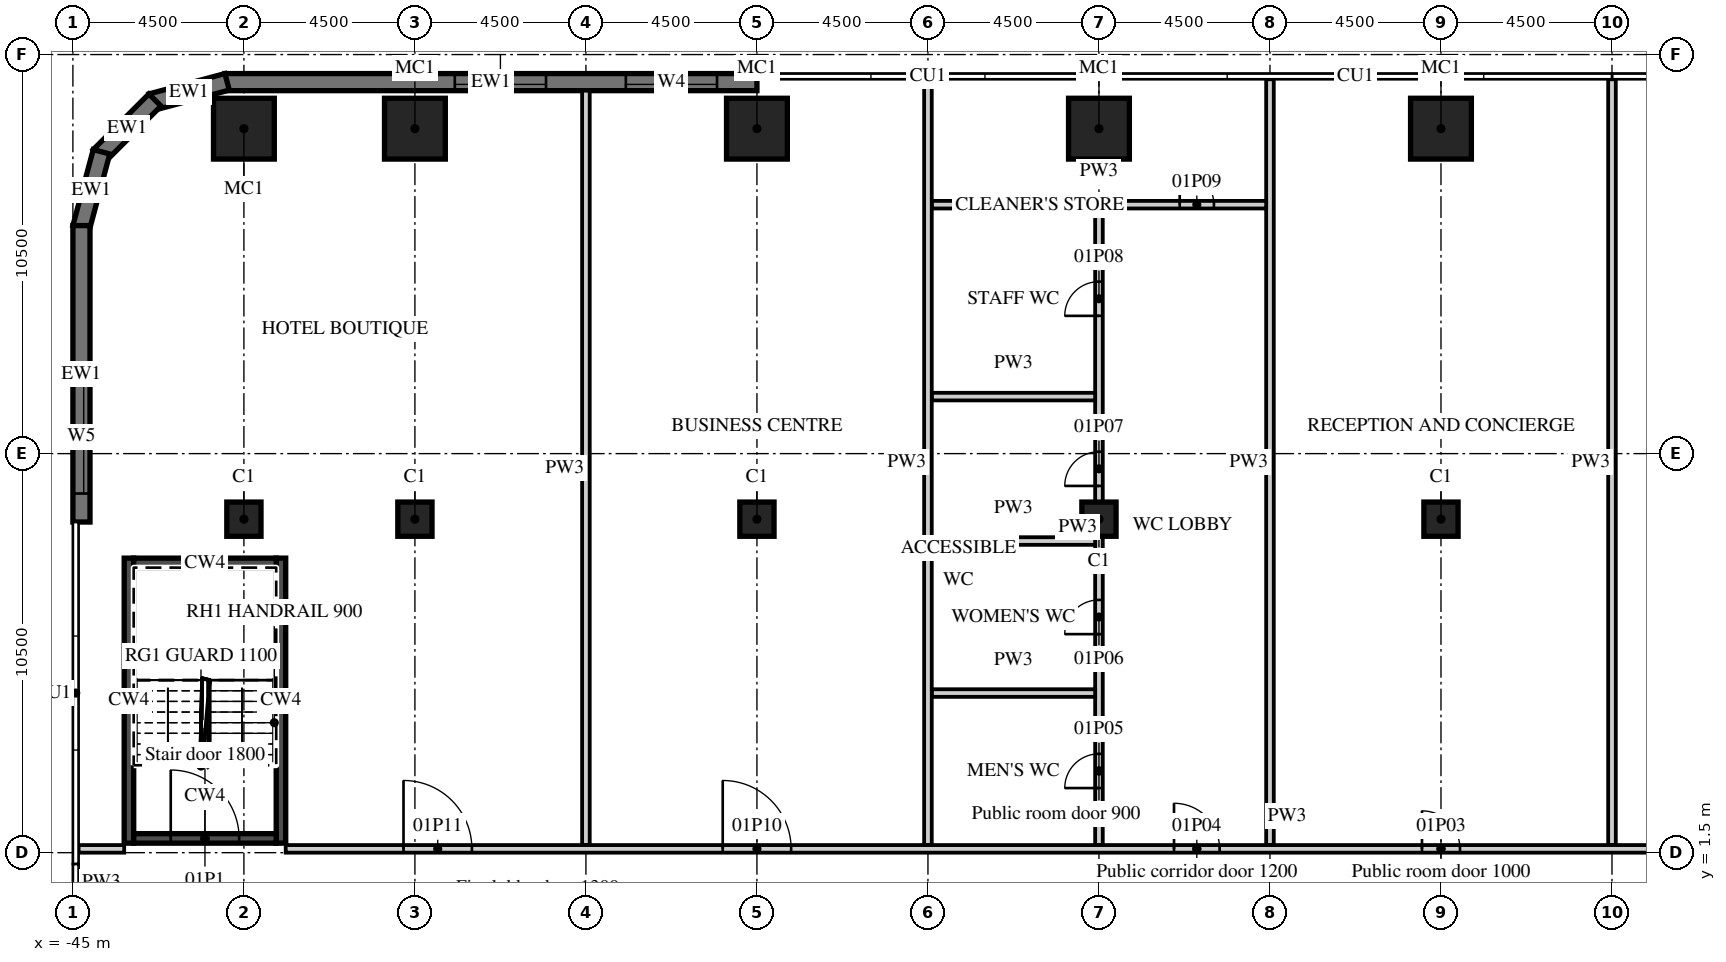
"""IFC4 building model, lengths in metres.
Left out: names, types, materials, properties, quantities, classifications, styles, units other than length and angle.
Written with IfcOpenShell. Run it as: python <this file> out.ifc"""

import sys

from ifc_helpers import new_model, si_unit, direction, frame, frame_2d, origin, origin_2d, place, context, subcontext, project, spatial, polyline, rectangle, outline, extrude, element, fill, save


model = new_model("IFC4")
c1 = context("Model", 3, precision=1e-05, world=origin(), true_north=direction((0.0, 1.0)))
c2 = subcontext(c1, "Body", "Model", "MODEL_VIEW")
j1 = project(units=[si_unit("LENGTHUNIT", "METRE"), si_unit("PLANEANGLEUNIT", "RADIAN")], contexts=[c1])
p1 = place(None, origin())
s1 = spatial("IfcSite", under=j1, at=p1, CompositionType="ELEMENT")
p2 = place(p1, origin())
s2 = spatial("IfcBuilding", under=s1, at=p2, CompositionType="ELEMENT")
p3 = place(p2, frame((0.0, 0.0, 11.0)))
s3 = spatial("IfcBuildingStorey", under=s2, at=p3, CompositionType="ELEMENT", Elevation=11.0)
for number, where, z_axis, x_axis in (
    (1, (-40.5, 20.55, 0.0), (0.0, 0.0, 1.0), (1.0, 0.0, 0.0)),
    (2, (-36.0, 20.55, 0.0), (0.0, 0.0, 1.0), (1.0, 0.0, 0.0)),
    (3, (-27.0, 20.55, 0.0), (0.0, 0.0, 1.0), (1.0, 0.0, 0.0)),
    (4, (-18.0, 20.55, 0.0), (0.0, 0.0, 1.0), (1.0, 0.0, 0.0)),
    (5, (-9.0, 20.55, 0.0), (0.0, 0.0, 1.0), (1.0, 0.0, 0.0)),
):
    element("IfcColumn", number, at=place(p3, frame(where, z_axis=z_axis, x_axis=x_axis)), inside=s3, PredefinedType="COLUMN", context=c2, shape_type="SweptSolid", body=[
        extrude(rectangle(XDim=1.6, YDim=1.6, at=origin_2d()), origin(), (0.0, 0.0, 1.0), 6.0),
    ])
for number, where, z_axis, x_axis in (
    (6, (-40.5, 10.275, 0.0), (0.0, 0.0, 1.0), (1.0, 0.0, 0.0)),
    (7, (-36.0, 10.275, 0.0), (0.0, 0.0, 1.0), (1.0, 0.0, 0.0)),
    (8, (-27.0, 10.275, 0.0), (0.0, 0.0, 1.0), (1.0, 0.0, 0.0)),
    (9, (-18.0, 10.275, 0.0), (0.0, 0.0, 1.0), (1.0, 0.0, 0.0)),
    (10, (-9.0, 10.275, 0.0), (0.0, 0.0, 1.0), (1.0, 0.0, 0.0)),
):
    element("IfcColumn", number, at=place(p3, frame(where, z_axis=z_axis, x_axis=x_axis)), inside=s3, PredefinedType="COLUMN", context=c2, shape_type="SweptSolid", body=[
        extrude(rectangle(XDim=0.9, YDim=0.9, at=origin_2d()), origin(), (0.0, 0.0, 1.0), 6.0),
    ])
p4 = place(p3, frame((-27.0, 21.775, 0.0), z_axis=(0.0, 0.0, 1.0), x_axis=(-1.0, 0.0, 0.0)))
e11 = element("IfcWall", 11, at=p4, inside=s3, PredefinedType="SOLIDWALL", context=c2, shape_type="SweptSolid", body=[
    extrude(rectangle(XDim=14.0, YDim=0.45, at=frame_2d((7.0, 0.0))), origin(), (0.0, 0.0, 1.0), 5.55),
])
p5 = place(p4, frame((1.05, 0.0, 0.9)))
e12 = element("IfcOpeningElement", 12, at=p5, cuts=e11, PredefinedType="OPENING", context=c2, shape_type="SweptSolid", body=[
    extrude(rectangle(XDim=2.4, YDim=1.8, at=frame_2d((1.2, 0.9))), frame((0.0, 0.235, 0.0), z_axis=(0.0, -1.0, 0.0), x_axis=(1.0, 0.0, 0.0)), (0.0, 0.0, 1.0), 0.47),
])
p6 = place(p4, frame((5.55, 0.0, 0.9)))
e13 = element("IfcOpeningElement", 13, at=p6, cuts=e11, PredefinedType="OPENING", context=c2, shape_type="SweptSolid", body=[
    extrude(rectangle(XDim=2.4, YDim=1.8, at=frame_2d((1.2, 0.9))), frame((0.0, 0.235, 0.0), z_axis=(0.0, -1.0, 0.0), x_axis=(1.0, 0.0, 0.0)), (0.0, 0.0, 1.0), 0.47),
])
p7 = place(p3, frame((-40.942, 21.783, 0.0), z_axis=(0.0, 0.0, 1.0), x_axis=(-0.965926999034, -0.25881466832, 0.0)))
e14 = element("IfcWall", 14, at=p7, inside=s3, PredefinedType="SOLIDWALL", context=c2, shape_type="SweptSolid", body=[
    extrude(outline(polyline([(0.0, -0.225), (2.071, -0.225), (1.95, 0.225), (0.121, 0.225), (0.0, -0.225)])), origin(), (0.0, 0.0, 1.0), 5.55),
])
p8 = place(p3, frame((-42.841, 21.305, 0.0), z_axis=(0.0, 0.0, 1.0), x_axis=(-0.707106781187, -0.707106781187, 0.0)))
e15 = element("IfcWall", 15, at=p8, inside=s3, PredefinedType="SOLIDWALL", context=c2, shape_type="SweptSolid", body=[
    extrude(outline(polyline([(0.0, -0.225), (2.071, -0.225), (1.95, 0.225), (0.121, 0.225), (0.0, -0.225)])), origin(), (0.0, 0.0, 1.0), 5.55),
])
p9 = place(p3, frame((-44.247, 19.942, 0.0), z_axis=(0.0, 0.0, 1.0), x_axis=(-0.25881466832, -0.965926999034, 0.0)))
e16 = element("IfcWall", 16, at=p9, inside=s3, PredefinedType="SOLIDWALL", context=c2, shape_type="SweptSolid", body=[
    extrude(outline(polyline([(-0.0, -0.225), (2.07, -0.225), (1.95, 0.225), (0.12, 0.225), (-0.0, -0.225)])), origin(), (0.0, 0.0, 1.0), 5.55),
])
p10 = place(p3, frame((-44.775, 18.0, 0.0), z_axis=(0.0, 0.0, 1.0), x_axis=(0.0, -1.0, 0.0)))
e17 = element("IfcWall", 17, at=p10, inside=s3, PredefinedType="SOLIDWALL", context=c2, shape_type="SweptSolid", body=[
    extrude(rectangle(XDim=7.8, YDim=0.45, at=frame_2d((3.9, 0.0))), origin(), (0.0, 0.0, 1.0), 5.55),
])
p11 = place(p10, frame((4.05, 0.0, 0.9)))
e18 = element("IfcOpeningElement", 18, at=p11, cuts=e17, PredefinedType="OPENING", context=c2, shape_type="SweptSolid", body=[
    extrude(rectangle(XDim=3.0, YDim=1.8, at=frame_2d((1.5, 0.9))), frame((0.0, 0.235, 0.0), z_axis=(0.0, -1.0, 0.0), x_axis=(1.0, 0.0, 0.0)), (0.0, 0.0, 1.0), 0.47),
])
for number, where, z_axis, x_axis in (
    (19, (-43.525, 1.75, 0.0), (0.0, 0.0, 1.0), (0.0, 1.0, 0.0)),
    (20, (-39.525, 1.75, 0.0), (0.0, 0.0, 1.0), (0.0, 1.0, 0.0)),
):
    element("IfcWall", number, at=place(p3, frame(where, z_axis=z_axis, x_axis=x_axis)), inside=s3, PredefinedType="SHEAR", context=c2, shape_type="SweptSolid", body=[
        extrude(rectangle(XDim=7.5, YDim=0.25, at=frame_2d((3.75, 0.0))), origin(), (0.0, 0.0, 1.0), 5.55),
    ])
p12 = place(p3, frame((-43.4, 9.125, 0.0), z_axis=(0.0, 0.0, 1.0), x_axis=(1.0, 0.0, 0.0)))
e21 = element("IfcWall", 21, at=p12, inside=s3, PredefinedType="SHEAR", context=c2, shape_type="SweptSolid", body=[
    extrude(rectangle(XDim=3.75, YDim=0.25, at=frame_2d((1.875, 0.0))), origin(), (0.0, 0.0, 1.0), 5.55),
])
p13 = place(p3, frame((-43.4, 1.875, 0.0), z_axis=(0.0, 0.0, 1.0), x_axis=(1.0, 0.0, 0.0)))
e22 = element("IfcWall", 22, at=p13, inside=s3, PredefinedType="SHEAR", context=c2, shape_type="SweptSolid", body=[
    extrude(rectangle(XDim=3.75, YDim=0.25, at=frame_2d((1.875, 0.0))), origin(), (0.0, 0.0, 1.0), 5.55),
])
p14 = place(p13, frame((0.975, 0.0, 0.0)))
e23 = element("IfcOpeningElement", 23, at=p14, cuts=e22, PredefinedType="OPENING", context=c2, shape_type="SweptSolid", body=[
    extrude(rectangle(XDim=1.8, YDim=2.1, at=frame_2d((0.9, 1.05))), frame((0.0, 0.135, 0.0), z_axis=(0.0, -1.0, 0.0), x_axis=(1.0, 0.0, 0.0)), (0.0, 0.0, 1.0), 0.27),
])
for number, where, z_axis, x_axis in (
    (24, (-4.5, 1.7, 0.0), (0.0, 0.0, 1.0), (0.0, 1.0, 0.0)),
    (25, (-13.5, 1.7, 0.0), (0.0, 0.0, 1.0), (0.0, 1.0, 0.0)),
):
    element("IfcWall", number, at=place(p3, frame(where, z_axis=z_axis, x_axis=x_axis)), inside=s3, PredefinedType="PARTITIONING", context=c2, shape_type="SweptSolid", body=[
        extrude(rectangle(XDim=20.15, YDim=0.2, at=frame_2d((10.075, 0.0))), origin(), (0.0, 0.0, 1.0), 5.55),
    ])
p15 = place(p3, frame((-18.0, 1.7, 0.0), z_axis=(0.0, 0.0, 1.0), x_axis=(0.0, 1.0, 0.0)))
e26 = element("IfcWall", 26, at=p15, inside=s3, PredefinedType="PARTITIONING", context=c2, shape_type="SweptSolid", body=[
    extrude(rectangle(XDim=16.75, YDim=0.2, at=frame_2d((8.375, 0.0))), origin(), (0.0, 0.0, 1.0), 5.55),
])
p16 = place(p15, frame((1.5, 0.0, 0.0)))
e27 = element("IfcOpeningElement", 27, at=p16, cuts=e26, PredefinedType="OPENING", context=c2, shape_type="SweptSolid", body=[
    extrude(rectangle(XDim=0.9, YDim=2.1, at=frame_2d((0.45, 1.05))), frame((0.0, 0.11, 0.0), z_axis=(0.0, -1.0, 0.0), x_axis=(1.0, 0.0, 0.0)), (0.0, 0.0, 1.0), 0.22),
])
p17 = place(p15, frame((5.55, 0.0, 0.0)))
e28 = element("IfcOpeningElement", 28, at=p17, cuts=e26, PredefinedType="OPENING", context=c2, shape_type="SweptSolid", body=[
    extrude(rectangle(XDim=0.9, YDim=2.1, at=frame_2d((0.45, 1.05))), frame((0.0, 0.11, 0.0), z_axis=(0.0, -1.0, 0.0), x_axis=(1.0, 0.0, 0.0)), (0.0, 0.0, 1.0), 0.22),
])
p18 = place(p15, frame((9.45, 0.0, 0.0)))
e29 = element("IfcOpeningElement", 29, at=p18, cuts=e26, PredefinedType="OPENING", context=c2, shape_type="SweptSolid", body=[
    extrude(rectangle(XDim=0.9, YDim=2.1, at=frame_2d((0.45, 1.05))), frame((0.0, 0.11, 0.0), z_axis=(0.0, -1.0, 0.0), x_axis=(1.0, 0.0, 0.0)), (0.0, 0.0, 1.0), 0.22),
])
p19 = place(p15, frame((13.925, 0.0, 0.0)))
e30 = element("IfcOpeningElement", 30, at=p19, cuts=e26, PredefinedType="OPENING", context=c2, shape_type="SweptSolid", body=[
    extrude(rectangle(XDim=0.9, YDim=2.1, at=frame_2d((0.45, 1.05))), frame((0.0, 0.11, 0.0), z_axis=(0.0, -1.0, 0.0), x_axis=(1.0, 0.0, 0.0)), (0.0, 0.0, 1.0), 0.22),
])
for number, where, z_axis, x_axis in (
    (31, (-22.4, 5.7, 0.0), (0.0, 0.0, 1.0), (1.0, 0.0, 0.0)),
    (32, (-22.4, 9.7, 0.0), (0.0, 0.0, 1.0), (1.0, 0.0, 0.0)),
    (33, (-22.4, 13.5, 0.0), (0.0, 0.0, 1.0), (1.0, 0.0, 0.0)),
):
    element("IfcWall", number, at=place(p3, frame(where, z_axis=z_axis, x_axis=x_axis)), inside=s3, PredefinedType="PARTITIONING", context=c2, shape_type="SweptSolid", body=[
        extrude(rectangle(XDim=4.3, YDim=0.2, at=frame_2d((2.15, 0.0))), origin(), (0.0, 0.0, 1.0), 5.55),
    ])
p20 = place(p3, frame((-22.4, 18.55, 0.0), z_axis=(0.0, 0.0, 1.0), x_axis=(1.0, 0.0, 0.0)))
e34 = element("IfcWall", 34, at=p20, inside=s3, PredefinedType="PARTITIONING", context=c2, shape_type="SweptSolid", body=[
    extrude(rectangle(XDim=8.8, YDim=0.2, at=frame_2d((4.4, 0.0))), origin(), (0.0, 0.0, 1.0), 5.55),
])
p21 = place(p20, frame((6.525, 0.0, 0.0)))
e35 = element("IfcOpeningElement", 35, at=p21, cuts=e34, PredefinedType="OPENING", context=c2, shape_type="SweptSolid", body=[
    extrude(rectangle(XDim=0.9, YDim=2.1, at=frame_2d((0.45, 1.05))), frame((0.0, 0.11, 0.0), z_axis=(0.0, -1.0, 0.0), x_axis=(1.0, 0.0, 0.0)), (0.0, 0.0, 1.0), 0.22),
])
p22 = place(p3, frame((-22.5, 1.7, 0.0), z_axis=(0.0, 0.0, 1.0), x_axis=(0.0, 1.0, 0.0)))
e36 = element("IfcWall", 36, at=p22, inside=s3, PredefinedType="PARTITIONING", context=c2, shape_type="SweptSolid", body=[
    extrude(rectangle(XDim=20.15, YDim=0.2, at=frame_2d((10.075, 0.0))), origin(), (0.0, 0.0, 1.0), 5.55),
])
p23 = place(p3, frame((-31.5, 1.7, 0.0), z_axis=(0.0, 0.0, 1.0), x_axis=(0.0, 1.0, 0.0)))
e37 = element("IfcWall", 37, at=p23, inside=s3, PredefinedType="PARTITIONING", context=c2, shape_type="SweptSolid", body=[
    extrude(rectangle(XDim=19.85, YDim=0.2, at=frame_2d((9.925, 0.0))), origin(), (0.0, 0.0, 1.0), 5.55),
])
p24 = place(p3, frame((-39.4, 1.6, 0.0), z_axis=(0.0, 0.0, 1.0), x_axis=(1.0, 0.0, 0.0)))
e38 = element("IfcWall", 38, at=p24, inside=s3, PredefinedType="PARTITIONING", context=c2, shape_type="SweptSolid", body=[
    extrude(rectangle(XDim=52.7, YDim=0.2, at=frame_2d((26.35, 0.0))), origin(), (0.0, 0.0, 1.0), 5.55),
])
p25 = place(p24, frame((46.49, 0.0, 0.0)))
e39 = element("IfcOpeningElement", 39, at=p25, cuts=e38, PredefinedType="OPENING", context=c2, shape_type="SweptSolid", body=[
    extrude(rectangle(XDim=1.8, YDim=2.1, at=frame_2d((0.9, 1.05))), frame((0.0, 0.11, 0.0), z_axis=(0.0, -1.0, 0.0), x_axis=(1.0, 0.0, 0.0)), (0.0, 0.0, 1.0), 0.22),
])
p26 = place(p24, frame((39.41, 0.0, 0.0)))
e40 = element("IfcOpeningElement", 40, at=p26, cuts=e38, PredefinedType="OPENING", context=c2, shape_type="SweptSolid", body=[
    extrude(rectangle(XDim=1.8, YDim=2.1, at=frame_2d((0.9, 1.05))), frame((0.0, 0.11, 0.0), z_axis=(0.0, -1.0, 0.0), x_axis=(1.0, 0.0, 0.0)), (0.0, 0.0, 1.0), 0.22),
])
p27 = place(p24, frame((29.9, 0.0, 0.0)))
e41 = element("IfcOpeningElement", 41, at=p27, cuts=e38, PredefinedType="OPENING", context=c2, shape_type="SweptSolid", body=[
    extrude(rectangle(XDim=1.0, YDim=2.1, at=frame_2d((0.5, 1.05))), frame((0.0, 0.11, 0.0), z_axis=(0.0, -1.0, 0.0), x_axis=(1.0, 0.0, 0.0)), (0.0, 0.0, 1.0), 0.22),
])
p28 = place(p24, frame((23.375, 0.0, 0.0)))
e42 = element("IfcOpeningElement", 42, at=p28, cuts=e38, PredefinedType="OPENING", context=c2, shape_type="SweptSolid", body=[
    extrude(rectangle(XDim=1.2, YDim=2.1, at=frame_2d((0.6, 1.05))), frame((0.0, 0.11, 0.0), z_axis=(0.0, -1.0, 0.0), x_axis=(1.0, 0.0, 0.0)), (0.0, 0.0, 1.0), 0.22),
])
p29 = place(p24, frame((11.5, 0.0, 0.0)))
e43 = element("IfcOpeningElement", 43, at=p29, cuts=e38, PredefinedType="OPENING", context=c2, shape_type="SweptSolid", body=[
    extrude(rectangle(XDim=1.8, YDim=2.1, at=frame_2d((0.9, 1.05))), frame((0.0, 0.11, 0.0), z_axis=(0.0, -1.0, 0.0), x_axis=(1.0, 0.0, 0.0)), (0.0, 0.0, 1.0), 0.22),
])
p30 = place(p24, frame((3.1, 0.0, 0.0)))
e44 = element("IfcOpeningElement", 44, at=p30, cuts=e38, PredefinedType="OPENING", context=c2, shape_type="SweptSolid", body=[
    extrude(rectangle(XDim=1.8, YDim=2.1, at=frame_2d((0.9, 1.05))), frame((0.0, 0.11, 0.0), z_axis=(0.0, -1.0, 0.0), x_axis=(1.0, 0.0, 0.0)), (0.0, 0.0, 1.0), 0.22),
])
p31 = place(p3, frame((-44.85, 1.6, 0.0), z_axis=(0.0, 0.0, 1.0), x_axis=(1.0, 0.0, 0.0)))
e45 = element("IfcWall", 45, at=p31, inside=s3, PredefinedType="PARTITIONING", context=c2, shape_type="SweptSolid", body=[
    extrude(rectangle(XDim=1.2, YDim=0.2, at=frame_2d((0.6, 0.0))), origin(), (0.0, 0.0, 1.0), 5.55),
])
p32 = place(p5, origin())
e46 = element("IfcWindow", 46, at=p32, inside=s3, PartitioningType="SINGLE_PANEL", PredefinedType="WINDOW", context=c2, shape_type="SweptSolid", body=[
    extrude(rectangle(XDim=2.4, YDim=1.8, at=frame_2d((1.2, 0.9))), frame((0.0, 0.09, 0.0), z_axis=(0.0, -1.0, 0.0), x_axis=(1.0, 0.0, 0.0)), (0.0, 0.0, 1.0), 0.06),
])
fill(e12, e46)
p33 = place(p6, origin())
e47 = element("IfcWindow", 47, at=p33, inside=s3, PartitioningType="SINGLE_PANEL", PredefinedType="WINDOW", context=c2, shape_type="SweptSolid", body=[
    extrude(rectangle(XDim=2.4, YDim=1.8, at=frame_2d((1.2, 0.9))), frame((0.0, 0.09, 0.0), z_axis=(0.0, -1.0, 0.0), x_axis=(1.0, 0.0, 0.0)), (0.0, 0.0, 1.0), 0.06),
])
fill(e13, e47)
p34 = place(p11, origin())
e48 = element("IfcWindow", 48, at=p34, inside=s3, PartitioningType="SINGLE_PANEL", PredefinedType="WINDOW", context=c2, shape_type="SweptSolid", body=[
    extrude(rectangle(XDim=3.0, YDim=1.8, at=frame_2d((1.5, 0.9))), frame((0.0, 0.09, 0.0), z_axis=(0.0, -1.0, 0.0), x_axis=(1.0, 0.0, 0.0)), (0.0, 0.0, 1.0), 0.06),
])
fill(e18, e48)
p35 = place(p14, origin())
e49 = element("IfcDoor", 49, at=p35, inside=s3, OperationType="DOUBLE_DOOR_DOUBLE_SWING", PredefinedType="DOOR", context=c2, shape_type="SweptSolid", body=[
    extrude(rectangle(XDim=1.8, YDim=2.1, at=frame_2d((0.9, 1.05))), frame((0.0, 0.025, 0.0), z_axis=(0.0, -1.0, 0.0), x_axis=(1.0, 0.0, 0.0)), (0.0, 0.0, 1.0), 0.05),
])
fill(e23, e49)
p36 = place(p27, origin())
e50 = element("IfcDoor", 50, at=p36, inside=s3, OperationType="SINGLE_SWING_LEFT", PredefinedType="DOOR", context=c2, shape_type="SweptSolid", body=[
    extrude(rectangle(XDim=1.0, YDim=2.1, at=frame_2d((0.5, 1.05))), frame((0.0, 0.025, 0.0), z_axis=(0.0, -1.0, 0.0), x_axis=(1.0, 0.0, 0.0)), (0.0, 0.0, 1.0), 0.05),
])
fill(e41, e50)
p37 = place(p28, origin())
e51 = element("IfcDoor", 51, at=p37, inside=s3, OperationType="SINGLE_SWING_LEFT", PredefinedType="DOOR", context=c2, shape_type="SweptSolid", body=[
    extrude(rectangle(XDim=1.2, YDim=2.1, at=frame_2d((0.6, 1.05))), frame((0.0, 0.025, 0.0), z_axis=(0.0, -1.0, 0.0), x_axis=(1.0, 0.0, 0.0)), (0.0, 0.0, 1.0), 0.05),
])
fill(e42, e51)
p38 = place(p16, origin())
e52 = element("IfcDoor", 52, at=p38, inside=s3, OperationType="SINGLE_SWING_LEFT", PredefinedType="DOOR", context=c2, shape_type="SweptSolid", body=[
    extrude(rectangle(XDim=0.9, YDim=2.1, at=frame_2d((0.45, 1.05))), frame((0.0, 0.025, 0.0), z_axis=(0.0, -1.0, 0.0), x_axis=(1.0, 0.0, 0.0)), (0.0, 0.0, 1.0), 0.05),
])
fill(e27, e52)
p39 = place(p17, origin())
e53 = element("IfcDoor", 53, at=p39, inside=s3, OperationType="SINGLE_SWING_LEFT", PredefinedType="DOOR", context=c2, shape_type="SweptSolid", body=[
    extrude(rectangle(XDim=0.9, YDim=2.1, at=frame_2d((0.45, 1.05))), frame((0.0, 0.025, 0.0), z_axis=(0.0, -1.0, 0.0), x_axis=(1.0, 0.0, 0.0)), (0.0, 0.0, 1.0), 0.05),
])
fill(e28, e53)
p40 = place(p18, origin())
e54 = element("IfcDoor", 54, at=p40, inside=s3, OperationType="SINGLE_SWING_LEFT", PredefinedType="DOOR", context=c2, shape_type="SweptSolid", body=[
    extrude(rectangle(XDim=0.9, YDim=2.1, at=frame_2d((0.45, 1.05))), frame((0.0, 0.025, 0.0), z_axis=(0.0, -1.0, 0.0), x_axis=(1.0, 0.0, 0.0)), (0.0, 0.0, 1.0), 0.05),
])
fill(e29, e54)
p41 = place(p19, origin())
e55 = element("IfcDoor", 55, at=p41, inside=s3, OperationType="SINGLE_SWING_LEFT", PredefinedType="DOOR", context=c2, shape_type="SweptSolid", body=[
    extrude(rectangle(XDim=0.9, YDim=2.1, at=frame_2d((0.45, 1.05))), frame((0.0, 0.025, 0.0), z_axis=(0.0, -1.0, 0.0), x_axis=(1.0, 0.0, 0.0)), (0.0, 0.0, 1.0), 0.05),
])
fill(e30, e55)
p42 = place(p21, origin())
e56 = element("IfcDoor", 56, at=p42, inside=s3, OperationType="SINGLE_SWING_LEFT", PredefinedType="DOOR", context=c2, shape_type="SweptSolid", body=[
    extrude(rectangle(XDim=0.9, YDim=2.1, at=frame_2d((0.45, 1.05))), frame((0.0, 0.025, 0.0), z_axis=(0.0, -1.0, 0.0), x_axis=(1.0, 0.0, 0.0)), (0.0, 0.0, 1.0), 0.05),
])
fill(e35, e56)
p43 = place(p29, origin())
e57 = element("IfcDoor", 57, at=p43, inside=s3, OperationType="DOUBLE_DOOR_DOUBLE_SWING", PredefinedType="DOOR", context=c2, shape_type="SweptSolid", body=[
    extrude(rectangle(XDim=1.8, YDim=2.1, at=frame_2d((0.9, 1.05))), frame((0.0, 0.025, 0.0), z_axis=(0.0, -1.0, 0.0), x_axis=(1.0, 0.0, 0.0)), (0.0, 0.0, 1.0), 0.05),
])
fill(e43, e57)
p44 = place(p30, origin())
e58 = element("IfcDoor", 58, at=p44, inside=s3, OperationType="DOUBLE_DOOR_DOUBLE_SWING", PredefinedType="DOOR", context=c2, shape_type="SweptSolid", body=[
    extrude(rectangle(XDim=1.8, YDim=2.1, at=frame_2d((0.9, 1.05))), frame((0.0, 0.025, 0.0), z_axis=(0.0, -1.0, 0.0), x_axis=(1.0, 0.0, 0.0)), (0.0, 0.0, 1.0), 0.05),
])
fill(e44, e58)
save(model, sys.argv[1])
